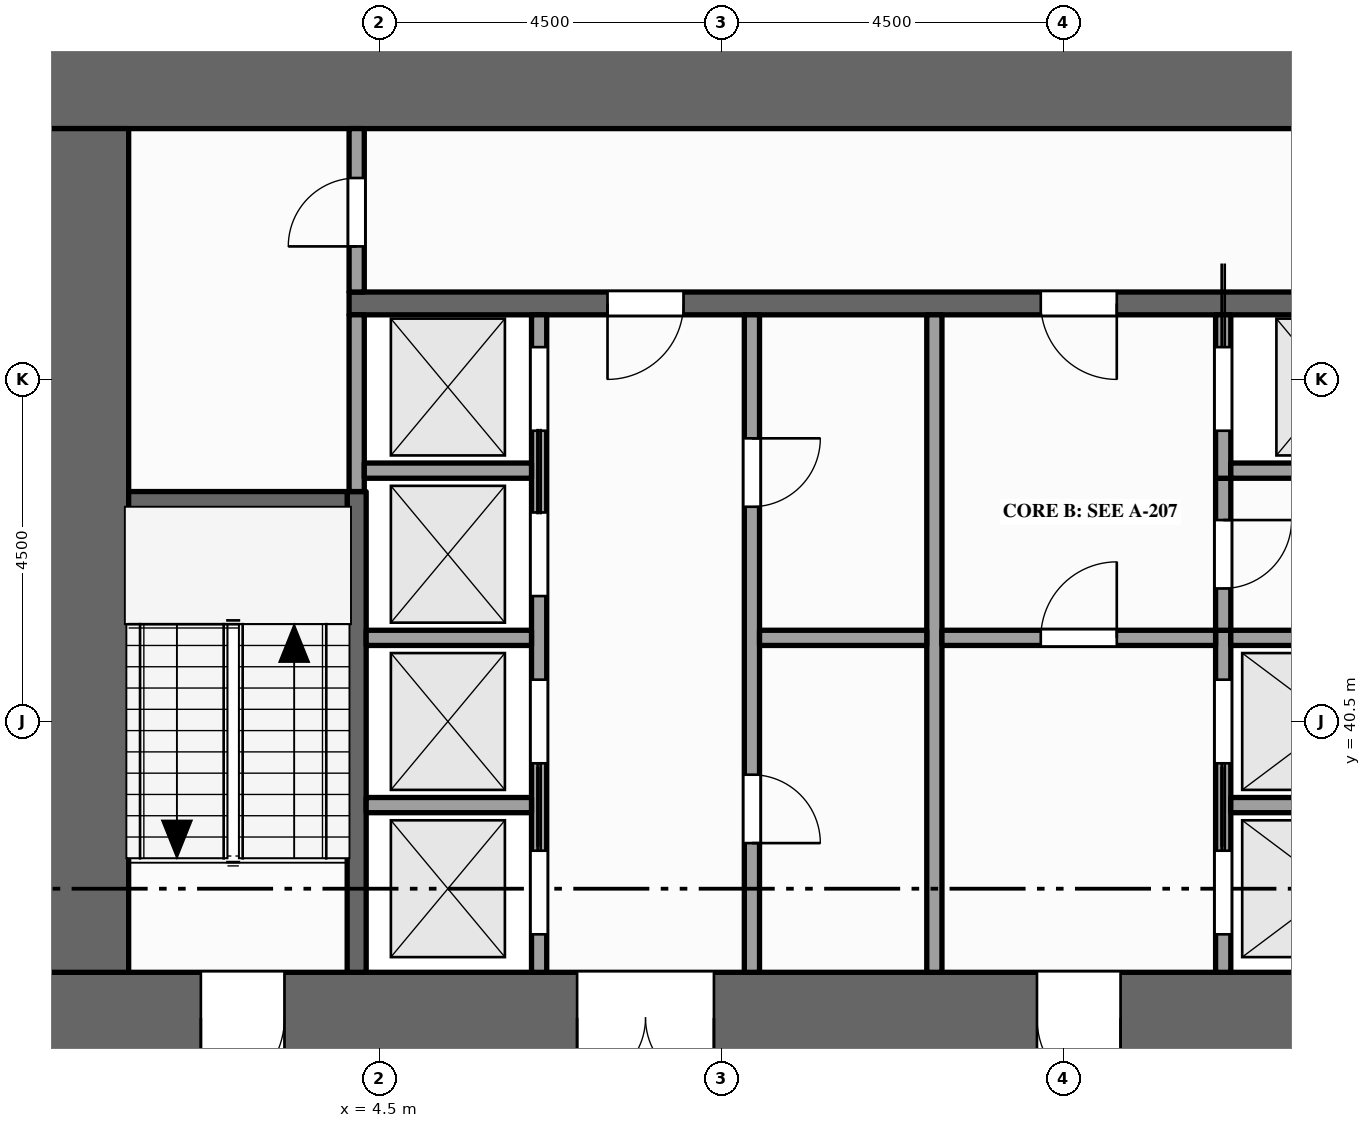
"""IFC4 building model, lengths in metres.
Left out: names, types, materials, properties, quantities, classifications, styles, units other than length and angle.
Written with IfcOpenShell. Run it as: python <this file> out.ifc"""

import sys

from ifc_helpers import new_model, si_unit, direction, frame, frame_2d, origin, place, context, subcontext, project, spatial, rectangle, extrude, element, fill, save


model = new_model("IFC4")
c1 = context("Model", 3, precision=1e-05, world=origin(), true_north=direction((0.0, 1.0)))
c2 = subcontext(c1, "Body", "Model", "MODEL_VIEW")
j1 = project(units=[si_unit("LENGTHUNIT", "METRE"), si_unit("PLANEANGLEUNIT", "RADIAN")], contexts=[c1])
p1 = place(None, origin())
s1 = spatial("IfcSite", under=j1, at=p1, CompositionType="ELEMENT")
p2 = place(p1, origin())
s2 = spatial("IfcBuilding", under=s1, at=p2, CompositionType="ELEMENT")
p3 = place(p2, frame((0.0, 0.0, 33.0)))
s3 = spatial("IfcBuildingStorey", under=s2, at=p3, CompositionType="ELEMENT", Elevation=33.0)
p4 = place(p3, frame((0.0, 36.6, -0.15), z_axis=(0.0, 0.0, 1.0), x_axis=(1.0, 0.0, 0.0)))
e1 = element("IfcWall", 1, at=p4, inside=s3, PredefinedType="SHEAR", context=c2, shape_type="SweptSolid", body=[
    extrude(rectangle(XDim=22.5, YDim=1.2, at=frame_2d((11.25, 0.0))), origin(), (0.0, 0.0, 1.0), 4.0),
])
p5 = place(p4, frame((7.1, 0.0, 0.15)))
e2 = element("IfcOpeningElement", 2, at=p5, cuts=e1, PredefinedType="OPENING", context=c2, shape_type="SweptSolid", body=[
    extrude(rectangle(XDim=1.8, YDim=2.1, at=frame_2d((0.9, 1.05))), frame((0.0, 0.61, 0.0), z_axis=(0.0, -1.0, 0.0), x_axis=(1.0, 0.0, 0.0)), (0.0, 0.0, 1.0), 1.22),
])
p6 = place(p4, frame((13.15, 0.0, 0.15)))
e3 = element("IfcOpeningElement", 3, at=p6, cuts=e1, PredefinedType="OPENING", context=c2, shape_type="SweptSolid", body=[
    extrude(rectangle(XDim=1.1, YDim=2.1, at=frame_2d((0.55, 1.05))), frame((0.0, 0.61, 0.0), z_axis=(0.0, -1.0, 0.0), x_axis=(1.0, 0.0, 0.0)), (0.0, 0.0, 1.0), 1.22),
])
p7 = place(p4, frame((2.15, 0.0, 0.15)))
e4 = element("IfcOpeningElement", 4, at=p7, cuts=e1, PredefinedType="OPENING", context=c2, shape_type="SweptSolid", body=[
    extrude(rectangle(XDim=1.1, YDim=2.1, at=frame_2d((0.55, 1.05))), frame((0.0, 0.61, 0.0), z_axis=(0.0, -1.0, 0.0), x_axis=(1.0, 0.0, 0.0)), (0.0, 0.0, 1.0), 1.22),
])
p8 = place(p4, frame((19.35, 0.0, 0.15)))
e5 = element("IfcOpeningElement", 5, at=p8, cuts=e1, PredefinedType="OPENING", context=c2, shape_type="SweptSolid", body=[
    extrude(rectangle(XDim=1.1, YDim=2.1, at=frame_2d((0.55, 1.05))), frame((0.0, 0.61, 0.0), z_axis=(0.0, -1.0, 0.0), x_axis=(1.0, 0.0, 0.0)), (0.0, 0.0, 1.0), 1.22),
])
p9 = place(p3, frame((0.0, 48.9, -0.15), z_axis=(0.0, 0.0, 1.0), x_axis=(1.0, 0.0, 0.0)))
e6 = element("IfcWall", 6, at=p9, inside=s3, PredefinedType="SHEAR", context=c2, shape_type="SweptSolid", body=[
    extrude(rectangle(XDim=22.5, YDim=1.2, at=frame_2d((11.25, 0.0))), origin(), (0.0, 0.0, 1.0), 4.0),
])
p10 = place(p3, frame((0.6, 37.2, -0.15), z_axis=(0.0, 0.0, 1.0), x_axis=(0.0, 1.0, 0.0)))
e7 = element("IfcWall", 7, at=p10, inside=s3, PredefinedType="SHEAR", context=c2, shape_type="SweptSolid", body=[
    extrude(rectangle(XDim=11.1, YDim=1.2, at=frame_2d((5.55, 0.0))), origin(), (0.0, 0.0, 1.0), 4.0),
])
p11 = place(p3, frame((4.2, 37.2, 0.0), z_axis=(0.0, 0.0, 1.0), x_axis=(0.0, 1.0, 0.0)))
e8 = element("IfcWall", 8, at=p11, inside=s3, PredefinedType="SHEAR", context=c2, shape_type="SweptSolid", body=[
    extrude(rectangle(XDim=6.325, YDim=0.25, at=frame_2d((3.163, 0.0))), origin(), (0.0, 0.0, 1.0), 3.85),
])
p12 = place(p3, frame((4.2, 43.525, 0.0), z_axis=(0.0, 0.0, 1.0), x_axis=(0.0, 1.0, 0.0)))
e9 = element("IfcWall", 9, at=p12, inside=s3, PredefinedType="SOLIDWALL", context=c2, shape_type="SweptSolid", body=[
    extrude(rectangle(XDim=2.325, YDim=0.2, at=frame_2d((1.163, 0.0))), origin(), (0.0, 0.0, 1.0), 3.85),
])
p13 = place(p3, frame((4.2, 46.15, 0.0), z_axis=(0.0, 0.0, 1.0), x_axis=(0.0, 1.0, 0.0)))
e10 = element("IfcWall", 10, at=p13, inside=s3, PredefinedType="PARTITIONING", context=c2, shape_type="SweptSolid", body=[
    extrude(rectangle(XDim=2.15, YDim=0.2, at=frame_2d((1.075, 0.0))), origin(), (0.0, 0.0, 1.0), 3.85),
])
p14 = place(p13, frame((0.6, 0.0, 0.0)))
e11 = element("IfcOpeningElement", 11, at=p14, cuts=e10, PredefinedType="OPENING", context=c2, shape_type="SweptSolid", body=[
    extrude(rectangle(XDim=0.9, YDim=2.1, at=frame_2d((0.45, 1.05))), frame((0.0, 0.11, 0.0), z_axis=(0.0, -1.0, 0.0), x_axis=(1.0, 0.0, 0.0)), (0.0, 0.0, 1.0), 0.22),
])
p15 = place(p3, frame((6.6, 37.2, 0.0), z_axis=(0.0, 0.0, 1.0), x_axis=(0.0, 1.0, 0.0)))
e12 = element("IfcWall", 12, at=p15, inside=s3, PredefinedType="SOLIDWALL", context=c2, shape_type="SweptSolid", body=[
    extrude(rectangle(XDim=8.65, YDim=0.2, at=frame_2d((4.325, 0.0))), origin(), (0.0, 0.0, 1.0), 3.85),
])
p16 = place(p15, frame((0.5, 0.0, 0.012)))
e13 = element("IfcOpeningElement", 13, at=p16, cuts=e12, PredefinedType="OPENING", context=c2, shape_type="SweptSolid", body=[
    extrude(rectangle(XDim=1.1, YDim=2.1, at=frame_2d((0.55, 1.05))), frame((0.0, 0.11, 0.0), z_axis=(0.0, -1.0, 0.0), x_axis=(1.0, 0.0, 0.0)), (0.0, 0.0, 1.0), 0.22),
])
p17 = place(p15, frame((2.75, 0.0, 0.012)))
e14 = element("IfcOpeningElement", 14, at=p17, cuts=e12, PredefinedType="OPENING", context=c2, shape_type="SweptSolid", body=[
    extrude(rectangle(XDim=1.1, YDim=2.1, at=frame_2d((0.55, 1.05))), frame((0.0, 0.11, 0.0), z_axis=(0.0, -1.0, 0.0), x_axis=(1.0, 0.0, 0.0)), (0.0, 0.0, 1.0), 0.22),
])
p18 = place(p15, frame((4.95, 0.0, 0.012)))
e15 = element("IfcOpeningElement", 15, at=p18, cuts=e12, PredefinedType="OPENING", context=c2, shape_type="SweptSolid", body=[
    extrude(rectangle(XDim=1.1, YDim=2.1, at=frame_2d((0.55, 1.05))), frame((0.0, 0.11, 0.0), z_axis=(0.0, -1.0, 0.0), x_axis=(1.0, 0.0, 0.0)), (0.0, 0.0, 1.0), 0.22),
])
p19 = place(p15, frame((7.125, 0.0, 0.012)))
e16 = element("IfcOpeningElement", 16, at=p19, cuts=e12, PredefinedType="OPENING", context=c2, shape_type="SweptSolid", body=[
    extrude(rectangle(XDim=1.1, YDim=2.1, at=frame_2d((0.55, 1.05))), frame((0.0, 0.11, 0.0), z_axis=(0.0, -1.0, 0.0), x_axis=(1.0, 0.0, 0.0)), (0.0, 0.0, 1.0), 0.22),
])
p20 = place(p3, frame((9.4, 37.2, 0.0), z_axis=(0.0, 0.0, 1.0), x_axis=(0.0, 1.0, 0.0)))
e17 = element("IfcWall", 17, at=p20, inside=s3, PredefinedType="PARTITIONING", context=c2, shape_type="SweptSolid", body=[
    extrude(rectangle(XDim=8.65, YDim=0.2, at=frame_2d((4.325, 0.0))), origin(), (0.0, 0.0, 1.0), 3.85),
])
p21 = place(p20, frame((1.7, 0.0, 0.0)))
e18 = element("IfcOpeningElement", 18, at=p21, cuts=e17, PredefinedType="OPENING", context=c2, shape_type="SweptSolid", body=[
    extrude(rectangle(XDim=0.9, YDim=2.1, at=frame_2d((0.45, 1.05))), frame((0.0, 0.11, 0.0), z_axis=(0.0, -1.0, 0.0), x_axis=(1.0, 0.0, 0.0)), (0.0, 0.0, 1.0), 0.22),
])
p22 = place(p20, frame((6.125, 0.0, 0.0)))
e19 = element("IfcOpeningElement", 19, at=p22, cuts=e17, PredefinedType="OPENING", context=c2, shape_type="SweptSolid", body=[
    extrude(rectangle(XDim=0.9, YDim=2.1, at=frame_2d((0.45, 1.05))), frame((0.0, 0.11, 0.0), z_axis=(0.0, -1.0, 0.0), x_axis=(1.0, 0.0, 0.0)), (0.0, 0.0, 1.0), 0.22),
])
p23 = place(p3, frame((11.8, 37.2, 0.0), z_axis=(0.0, 0.0, 1.0), x_axis=(0.0, 1.0, 0.0)))
e20 = element("IfcWall", 20, at=p23, inside=s3, PredefinedType="PARTITIONING", context=c2, shape_type="SweptSolid", body=[
    extrude(rectangle(XDim=8.65, YDim=0.2, at=frame_2d((4.325, 0.0))), origin(), (0.0, 0.0, 1.0), 3.85),
])
p24 = place(p3, frame((15.6, 37.2, 0.0), z_axis=(0.0, 0.0, 1.0), x_axis=(0.0, 1.0, 0.0)))
e21 = element("IfcWall", 21, at=p24, inside=s3, PredefinedType="SOLIDWALL", context=c2, shape_type="SweptSolid", body=[
    extrude(rectangle(XDim=4.5, YDim=0.2, at=frame_2d((2.25, 0.0))), origin(), (0.0, 0.0, 1.0), 3.85),
])
p25 = place(p24, frame((0.5, 0.0, 0.012)))
e22 = element("IfcOpeningElement", 22, at=p25, cuts=e21, PredefinedType="OPENING", context=c2, shape_type="SweptSolid", body=[
    extrude(rectangle(XDim=1.1, YDim=2.1, at=frame_2d((0.55, 1.05))), frame((0.0, 0.11, 0.0), z_axis=(0.0, -1.0, 0.0), x_axis=(1.0, 0.0, 0.0)), (0.0, 0.0, 1.0), 0.22),
])
p26 = place(p24, frame((2.75, 0.0, 0.012)))
e23 = element("IfcOpeningElement", 23, at=p26, cuts=e21, PredefinedType="OPENING", context=c2, shape_type="SweptSolid", body=[
    extrude(rectangle(XDim=1.1, YDim=2.1, at=frame_2d((0.55, 1.05))), frame((0.0, 0.11, 0.0), z_axis=(0.0, -1.0, 0.0), x_axis=(1.0, 0.0, 0.0)), (0.0, 0.0, 1.0), 0.22),
])
p27 = place(p3, frame((15.6, 41.7, 0.0), z_axis=(0.0, 0.0, 1.0), x_axis=(0.0, 1.0, 0.0)))
e24 = element("IfcWall", 24, at=p27, inside=s3, PredefinedType="PARTITIONING", context=c2, shape_type="SweptSolid", body=[
    extrude(rectangle(XDim=2.0, YDim=0.2, at=frame_2d((1.0, 0.0))), origin(), (0.0, 0.0, 1.0), 3.85),
])
p28 = place(p27, frame((0.55, 0.0, 0.0)))
e25 = element("IfcOpeningElement", 25, at=p28, cuts=e24, PredefinedType="OPENING", context=c2, shape_type="SweptSolid", body=[
    extrude(rectangle(XDim=0.9, YDim=2.1, at=frame_2d((0.45, 1.05))), frame((0.0, 0.11, 0.0), z_axis=(0.0, -1.0, 0.0), x_axis=(1.0, 0.0, 0.0)), (0.0, 0.0, 1.0), 0.22),
])
p29 = place(p3, frame((15.6, 43.7, 0.0), z_axis=(0.0, 0.0, 1.0), x_axis=(0.0, 1.0, 0.0)))
e26 = element("IfcWall", 26, at=p29, inside=s3, PredefinedType="SOLIDWALL", context=c2, shape_type="SweptSolid", body=[
    extrude(rectangle(XDim=2.15, YDim=0.2, at=frame_2d((1.075, 0.0))), origin(), (0.0, 0.0, 1.0), 3.85),
])
p30 = place(p29, frame((0.625, 0.0, 0.012)))
e27 = element("IfcOpeningElement", 27, at=p30, cuts=e26, PredefinedType="OPENING", context=c2, shape_type="SweptSolid", body=[
    extrude(rectangle(XDim=1.1, YDim=2.1, at=frame_2d((0.55, 1.05))), frame((0.0, 0.11, 0.0), z_axis=(0.0, -1.0, 0.0), x_axis=(1.0, 0.0, 0.0)), (0.0, 0.0, 1.0), 0.22),
])
p31 = place(p3, frame((4.325, 39.4, 0.0), z_axis=(0.0, 0.0, 1.0), x_axis=(1.0, 0.0, 0.0)))
e28 = element("IfcWall", 28, at=p31, inside=s3, PredefinedType="SOLIDWALL", context=c2, shape_type="SweptSolid", body=[
    extrude(rectangle(XDim=2.175, YDim=0.2, at=frame_2d((1.087, 0.0))), origin(), (0.0, 0.0, 1.0), 3.85),
])
p32 = place(p3, frame((15.7, 39.4, 0.0), z_axis=(0.0, 0.0, 1.0), x_axis=(1.0, 0.0, 0.0)))
e29 = element("IfcWall", 29, at=p32, inside=s3, PredefinedType="SOLIDWALL", context=c2, shape_type="SweptSolid", body=[
    extrude(rectangle(XDim=2.675, YDim=0.2, at=frame_2d((1.337, 0.0))), origin(), (0.0, 0.0, 1.0), 3.85),
])
p33 = place(p3, frame((4.325, 41.6, 0.0), z_axis=(0.0, 0.0, 1.0), x_axis=(1.0, 0.0, 0.0)))
e30 = element("IfcWall", 30, at=p33, inside=s3, PredefinedType="SOLIDWALL", context=c2, shape_type="SweptSolid", body=[
    extrude(rectangle(XDim=2.175, YDim=0.2, at=frame_2d((1.087, 0.0))), origin(), (0.0, 0.0, 1.0), 3.85),
])
p34 = place(p3, frame((9.5, 41.6, 0.0), z_axis=(0.0, 0.0, 1.0), x_axis=(1.0, 0.0, 0.0)))
e31 = element("IfcWall", 31, at=p34, inside=s3, PredefinedType="PARTITIONING", context=c2, shape_type="SweptSolid", body=[
    extrude(rectangle(XDim=2.2, YDim=0.2, at=frame_2d((1.1, 0.0))), origin(), (0.0, 0.0, 1.0), 3.85),
])
p35 = place(p3, frame((11.9, 41.6, 0.0), z_axis=(0.0, 0.0, 1.0), x_axis=(1.0, 0.0, 0.0)))
e32 = element("IfcWall", 32, at=p35, inside=s3, PredefinedType="PARTITIONING", context=c2, shape_type="SweptSolid", body=[
    extrude(rectangle(XDim=3.6, YDim=0.2, at=frame_2d((1.8, 0.0))), origin(), (0.0, 0.0, 1.0), 3.85),
])
p36 = place(p35, frame((1.3, 0.0, 0.0)))
e33 = element("IfcOpeningElement", 33, at=p36, cuts=e32, PredefinedType="OPENING", context=c2, shape_type="SweptSolid", body=[
    extrude(rectangle(XDim=1.0, YDim=2.1, at=frame_2d((0.5, 1.05))), frame((0.0, 0.11, 0.0), z_axis=(0.0, -1.0, 0.0), x_axis=(1.0, 0.0, 0.0)), (0.0, 0.0, 1.0), 0.22),
])
p37 = place(p3, frame((15.7, 41.6, 0.0), z_axis=(0.0, 0.0, 1.0), x_axis=(1.0, 0.0, 0.0)))
e34 = element("IfcWall", 34, at=p37, inside=s3, PredefinedType="SOLIDWALL", context=c2, shape_type="SweptSolid", body=[
    extrude(rectangle(XDim=2.675, YDim=0.2, at=frame_2d((1.337, 0.0))), origin(), (0.0, 0.0, 1.0), 3.85),
])
p38 = place(p3, frame((1.2, 43.4, 0.0), z_axis=(0.0, 0.0, 1.0), x_axis=(1.0, 0.0, 0.0)))
e35 = element("IfcWall", 35, at=p38, inside=s3, PredefinedType="SHEAR", context=c2, shape_type="SweptSolid", body=[
    extrude(rectangle(XDim=2.875, YDim=0.25, at=frame_2d((1.438, 0.0))), origin(), (0.0, 0.0, 1.0), 3.85),
])
p39 = place(p3, frame((4.3, 43.8, 0.0), z_axis=(0.0, 0.0, 1.0), x_axis=(1.0, 0.0, 0.0)))
e36 = element("IfcWall", 36, at=p39, inside=s3, PredefinedType="SOLIDWALL", context=c2, shape_type="SweptSolid", body=[
    extrude(rectangle(XDim=2.2, YDim=0.2, at=frame_2d((1.1, 0.0))), origin(), (0.0, 0.0, 1.0), 3.85),
])
p40 = place(p3, frame((15.7, 43.8, 0.0), z_axis=(0.0, 0.0, 1.0), x_axis=(1.0, 0.0, 0.0)))
e37 = element("IfcWall", 37, at=p40, inside=s3, PredefinedType="SOLIDWALL", context=c2, shape_type="SweptSolid", body=[
    extrude(rectangle(XDim=2.7, YDim=0.2, at=frame_2d((1.35, 0.0))), origin(), (0.0, 0.0, 1.0), 3.85),
])
p41 = place(p3, frame((4.1, 46.0, 0.0), z_axis=(0.0, 0.0, 1.0), x_axis=(1.0, 0.0, 0.0)))
e38 = element("IfcWall", 38, at=p41, inside=s3, PredefinedType="SHEAR", context=c2, shape_type="SweptSolid", body=[
    extrude(rectangle(XDim=14.5, YDim=0.3, at=frame_2d((7.25, 0.0))), origin(), (0.0, 0.0, 1.0), 3.85),
])
p42 = place(p41, frame((3.4, 0.0, 0.0)))
e39 = element("IfcOpeningElement", 39, at=p42, cuts=e38, PredefinedType="OPENING", context=c2, shape_type="SweptSolid", body=[
    extrude(rectangle(XDim=1.0, YDim=2.1, at=frame_2d((0.5, 1.05))), frame((0.0, 0.16, 0.0), z_axis=(0.0, -1.0, 0.0), x_axis=(1.0, 0.0, 0.0)), (0.0, 0.0, 1.0), 0.32),
])
p43 = place(p41, frame((9.1, 0.0, 0.0)))
e40 = element("IfcOpeningElement", 40, at=p43, cuts=e38, PredefinedType="OPENING", context=c2, shape_type="SweptSolid", body=[
    extrude(rectangle(XDim=1.0, YDim=2.1, at=frame_2d((0.5, 1.05))), frame((0.0, 0.16, 0.0), z_axis=(0.0, -1.0, 0.0), x_axis=(1.0, 0.0, 0.0)), (0.0, 0.0, 1.0), 0.32),
])
p44 = place(p16, origin())
e41 = element("IfcDoor", 41, at=p44, inside=s3, OperationType="SLIDING_TO_RIGHT", PredefinedType="DOOR", context=c2, shape_type="SweptSolid", body=[
    extrude(rectangle(XDim=1.1, YDim=2.1, at=frame_2d((0.55, 1.05))), frame((0.0, 0.025, 0.0), z_axis=(0.0, -1.0, 0.0), x_axis=(1.0, 0.0, 0.0)), (0.0, 0.0, 1.0), 0.05),
])
fill(e13, e41)
p45 = place(p17, origin())
e42 = element("IfcDoor", 42, at=p45, inside=s3, OperationType="SLIDING_TO_LEFT", PredefinedType="DOOR", context=c2, shape_type="SweptSolid", body=[
    extrude(rectangle(XDim=1.1, YDim=2.1, at=frame_2d((0.55, 1.05))), frame((0.0, 0.025, 0.0), z_axis=(0.0, -1.0, 0.0), x_axis=(1.0, 0.0, 0.0)), (0.0, 0.0, 1.0), 0.05),
])
fill(e14, e42)
p46 = place(p18, origin())
e43 = element("IfcDoor", 43, at=p46, inside=s3, OperationType="SLIDING_TO_RIGHT", PredefinedType="DOOR", context=c2, shape_type="SweptSolid", body=[
    extrude(rectangle(XDim=1.1, YDim=2.1, at=frame_2d((0.55, 1.05))), frame((0.0, 0.025, 0.0), z_axis=(0.0, -1.0, 0.0), x_axis=(1.0, 0.0, 0.0)), (0.0, 0.0, 1.0), 0.05),
])
fill(e15, e43)
p47 = place(p19, origin())
e44 = element("IfcDoor", 44, at=p47, inside=s3, OperationType="SLIDING_TO_LEFT", PredefinedType="DOOR", context=c2, shape_type="SweptSolid", body=[
    extrude(rectangle(XDim=1.1, YDim=2.1, at=frame_2d((0.55, 1.05))), frame((0.0, 0.025, 0.0), z_axis=(0.0, -1.0, 0.0), x_axis=(1.0, 0.0, 0.0)), (0.0, 0.0, 1.0), 0.05),
])
fill(e16, e44)
p48 = place(p25, origin())
e45 = element("IfcDoor", 45, at=p48, inside=s3, OperationType="SLIDING_TO_RIGHT", PredefinedType="DOOR", context=c2, shape_type="SweptSolid", body=[
    extrude(rectangle(XDim=1.1, YDim=2.1, at=frame_2d((0.55, 1.05))), frame((0.0, 0.025, 0.0), z_axis=(0.0, -1.0, 0.0), x_axis=(1.0, 0.0, 0.0)), (0.0, 0.0, 1.0), 0.05),
])
fill(e22, e45)
p49 = place(p26, origin())
e46 = element("IfcDoor", 46, at=p49, inside=s3, OperationType="SLIDING_TO_LEFT", PredefinedType="DOOR", context=c2, shape_type="SweptSolid", body=[
    extrude(rectangle(XDim=1.1, YDim=2.1, at=frame_2d((0.55, 1.05))), frame((0.0, 0.025, 0.0), z_axis=(0.0, -1.0, 0.0), x_axis=(1.0, 0.0, 0.0)), (0.0, 0.0, 1.0), 0.05),
])
fill(e23, e46)
p50 = place(p30, origin())
e47 = element("IfcDoor", 47, at=p50, inside=s3, OperationType="SLIDING_TO_RIGHT", PredefinedType="DOOR", context=c2, shape_type="SweptSolid", body=[
    extrude(rectangle(XDim=1.1, YDim=2.1, at=frame_2d((0.55, 1.05))), frame((0.0, 0.025, 0.0), z_axis=(0.0, -1.0, 0.0), x_axis=(1.0, 0.0, 0.0)), (0.0, 0.0, 1.0), 0.05),
])
fill(e27, e47)
p51 = place(p5, origin())
e48 = element("IfcDoor", 48, at=p51, inside=s3, OperationType="DOUBLE_DOOR_SINGLE_SWING", PredefinedType="DOOR", context=c2, shape_type="SweptSolid", body=[
    extrude(rectangle(XDim=1.8, YDim=2.1, at=frame_2d((0.9, 1.05))), frame((0.0, 0.025, 0.0), z_axis=(0.0, -1.0, 0.0), x_axis=(1.0, 0.0, 0.0)), (0.0, 0.0, 1.0), 0.05),
])
fill(e2, e48)
p52 = place(p42, origin())
e49 = element("IfcDoor", 49, at=p52, inside=s3, OperationType="SINGLE_SWING_LEFT", PredefinedType="DOOR", context=c2, shape_type="SweptSolid", body=[
    extrude(rectangle(XDim=1.0, YDim=2.1, at=frame_2d((0.5, 1.05))), frame((0.0, 0.025, 0.0), z_axis=(0.0, -1.0, 0.0), x_axis=(1.0, 0.0, 0.0)), (0.0, 0.0, 1.0), 0.05),
])
fill(e39, e49)
p53 = place(p6, origin())
e50 = element("IfcDoor", 50, at=p53, inside=s3, OperationType="SINGLE_SWING_RIGHT", PredefinedType="DOOR", context=c2, shape_type="SweptSolid", body=[
    extrude(rectangle(XDim=1.1, YDim=2.1, at=frame_2d((0.55, 1.05))), frame((0.0, 0.025, 0.0), z_axis=(0.0, -1.0, 0.0), x_axis=(1.0, 0.0, 0.0)), (0.0, 0.0, 1.0), 0.05),
])
fill(e3, e50)
p54 = place(p36, origin())
e51 = element("IfcDoor", 51, at=p54, inside=s3, OperationType="SINGLE_SWING_RIGHT", PredefinedType="DOOR", context=c2, shape_type="SweptSolid", body=[
    extrude(rectangle(XDim=1.0, YDim=2.1, at=frame_2d((0.5, 1.05))), frame((0.0, 0.025, 0.0), z_axis=(0.0, -1.0, 0.0), x_axis=(1.0, 0.0, 0.0)), (0.0, 0.0, 1.0), 0.05),
])
fill(e33, e51)
p55 = place(p43, origin())
e52 = element("IfcDoor", 52, at=p55, inside=s3, OperationType="SINGLE_SWING_RIGHT", PredefinedType="DOOR", context=c2, shape_type="SweptSolid", body=[
    extrude(rectangle(XDim=1.0, YDim=2.1, at=frame_2d((0.5, 1.05))), frame((0.0, 0.025, 0.0), z_axis=(0.0, -1.0, 0.0), x_axis=(1.0, 0.0, 0.0)), (0.0, 0.0, 1.0), 0.05),
])
fill(e40, e52)
p56 = place(p7, origin())
e53 = element("IfcDoor", 53, at=p56, inside=s3, OperationType="SINGLE_SWING_LEFT", PredefinedType="DOOR", context=c2, shape_type="SweptSolid", body=[
    extrude(rectangle(XDim=1.1, YDim=2.1, at=frame_2d((0.55, 1.05))), frame((0.0, 0.025, 0.0), z_axis=(0.0, -1.0, 0.0), x_axis=(1.0, 0.0, 0.0)), (0.0, 0.0, 1.0), 0.05),
])
fill(e4, e53)
p57 = place(p14, origin())
e54 = element("IfcDoor", 54, at=p57, inside=s3, OperationType="SINGLE_SWING_LEFT", PredefinedType="DOOR", context=c2, shape_type="SweptSolid", body=[
    extrude(rectangle(XDim=0.9, YDim=2.1, at=frame_2d((0.45, 1.05))), frame((0.0, 0.025, 0.0), z_axis=(0.0, -1.0, 0.0), x_axis=(1.0, 0.0, 0.0)), (0.0, 0.0, 1.0), 0.05),
])
fill(e11, e54)
p58 = place(p21, origin())
e55 = element("IfcDoor", 55, at=p58, inside=s3, OperationType="SINGLE_SWING_LEFT", PredefinedType="DOOR", context=c2, shape_type="SweptSolid", body=[
    extrude(rectangle(XDim=0.9, YDim=2.1, at=frame_2d((0.45, 1.05))), frame((0.0, 0.025, 0.0), z_axis=(0.0, -1.0, 0.0), x_axis=(1.0, 0.0, 0.0)), (0.0, 0.0, 1.0), 0.05),
])
fill(e18, e55)
p59 = place(p22, origin())
e56 = element("IfcDoor", 56, at=p59, inside=s3, OperationType="SINGLE_SWING_RIGHT", PredefinedType="DOOR", context=c2, shape_type="SweptSolid", body=[
    extrude(rectangle(XDim=0.9, YDim=2.1, at=frame_2d((0.45, 1.05))), frame((0.0, 0.025, 0.0), z_axis=(0.0, -1.0, 0.0), x_axis=(1.0, 0.0, 0.0)), (0.0, 0.0, 1.0), 0.05),
])
fill(e19, e56)
p60 = place(p28, origin())
e57 = element("IfcDoor", 57, at=p60, inside=s3, OperationType="SINGLE_SWING_RIGHT", PredefinedType="DOOR", context=c2, shape_type="SweptSolid", body=[
    extrude(rectangle(XDim=0.9, YDim=2.1, at=frame_2d((0.45, 1.05))), frame((0.0, 0.025, 0.0), z_axis=(0.0, -1.0, 0.0), x_axis=(1.0, 0.0, 0.0)), (0.0, 0.0, 1.0), 0.05),
])
fill(e25, e57)
save(model, sys.argv[1])
